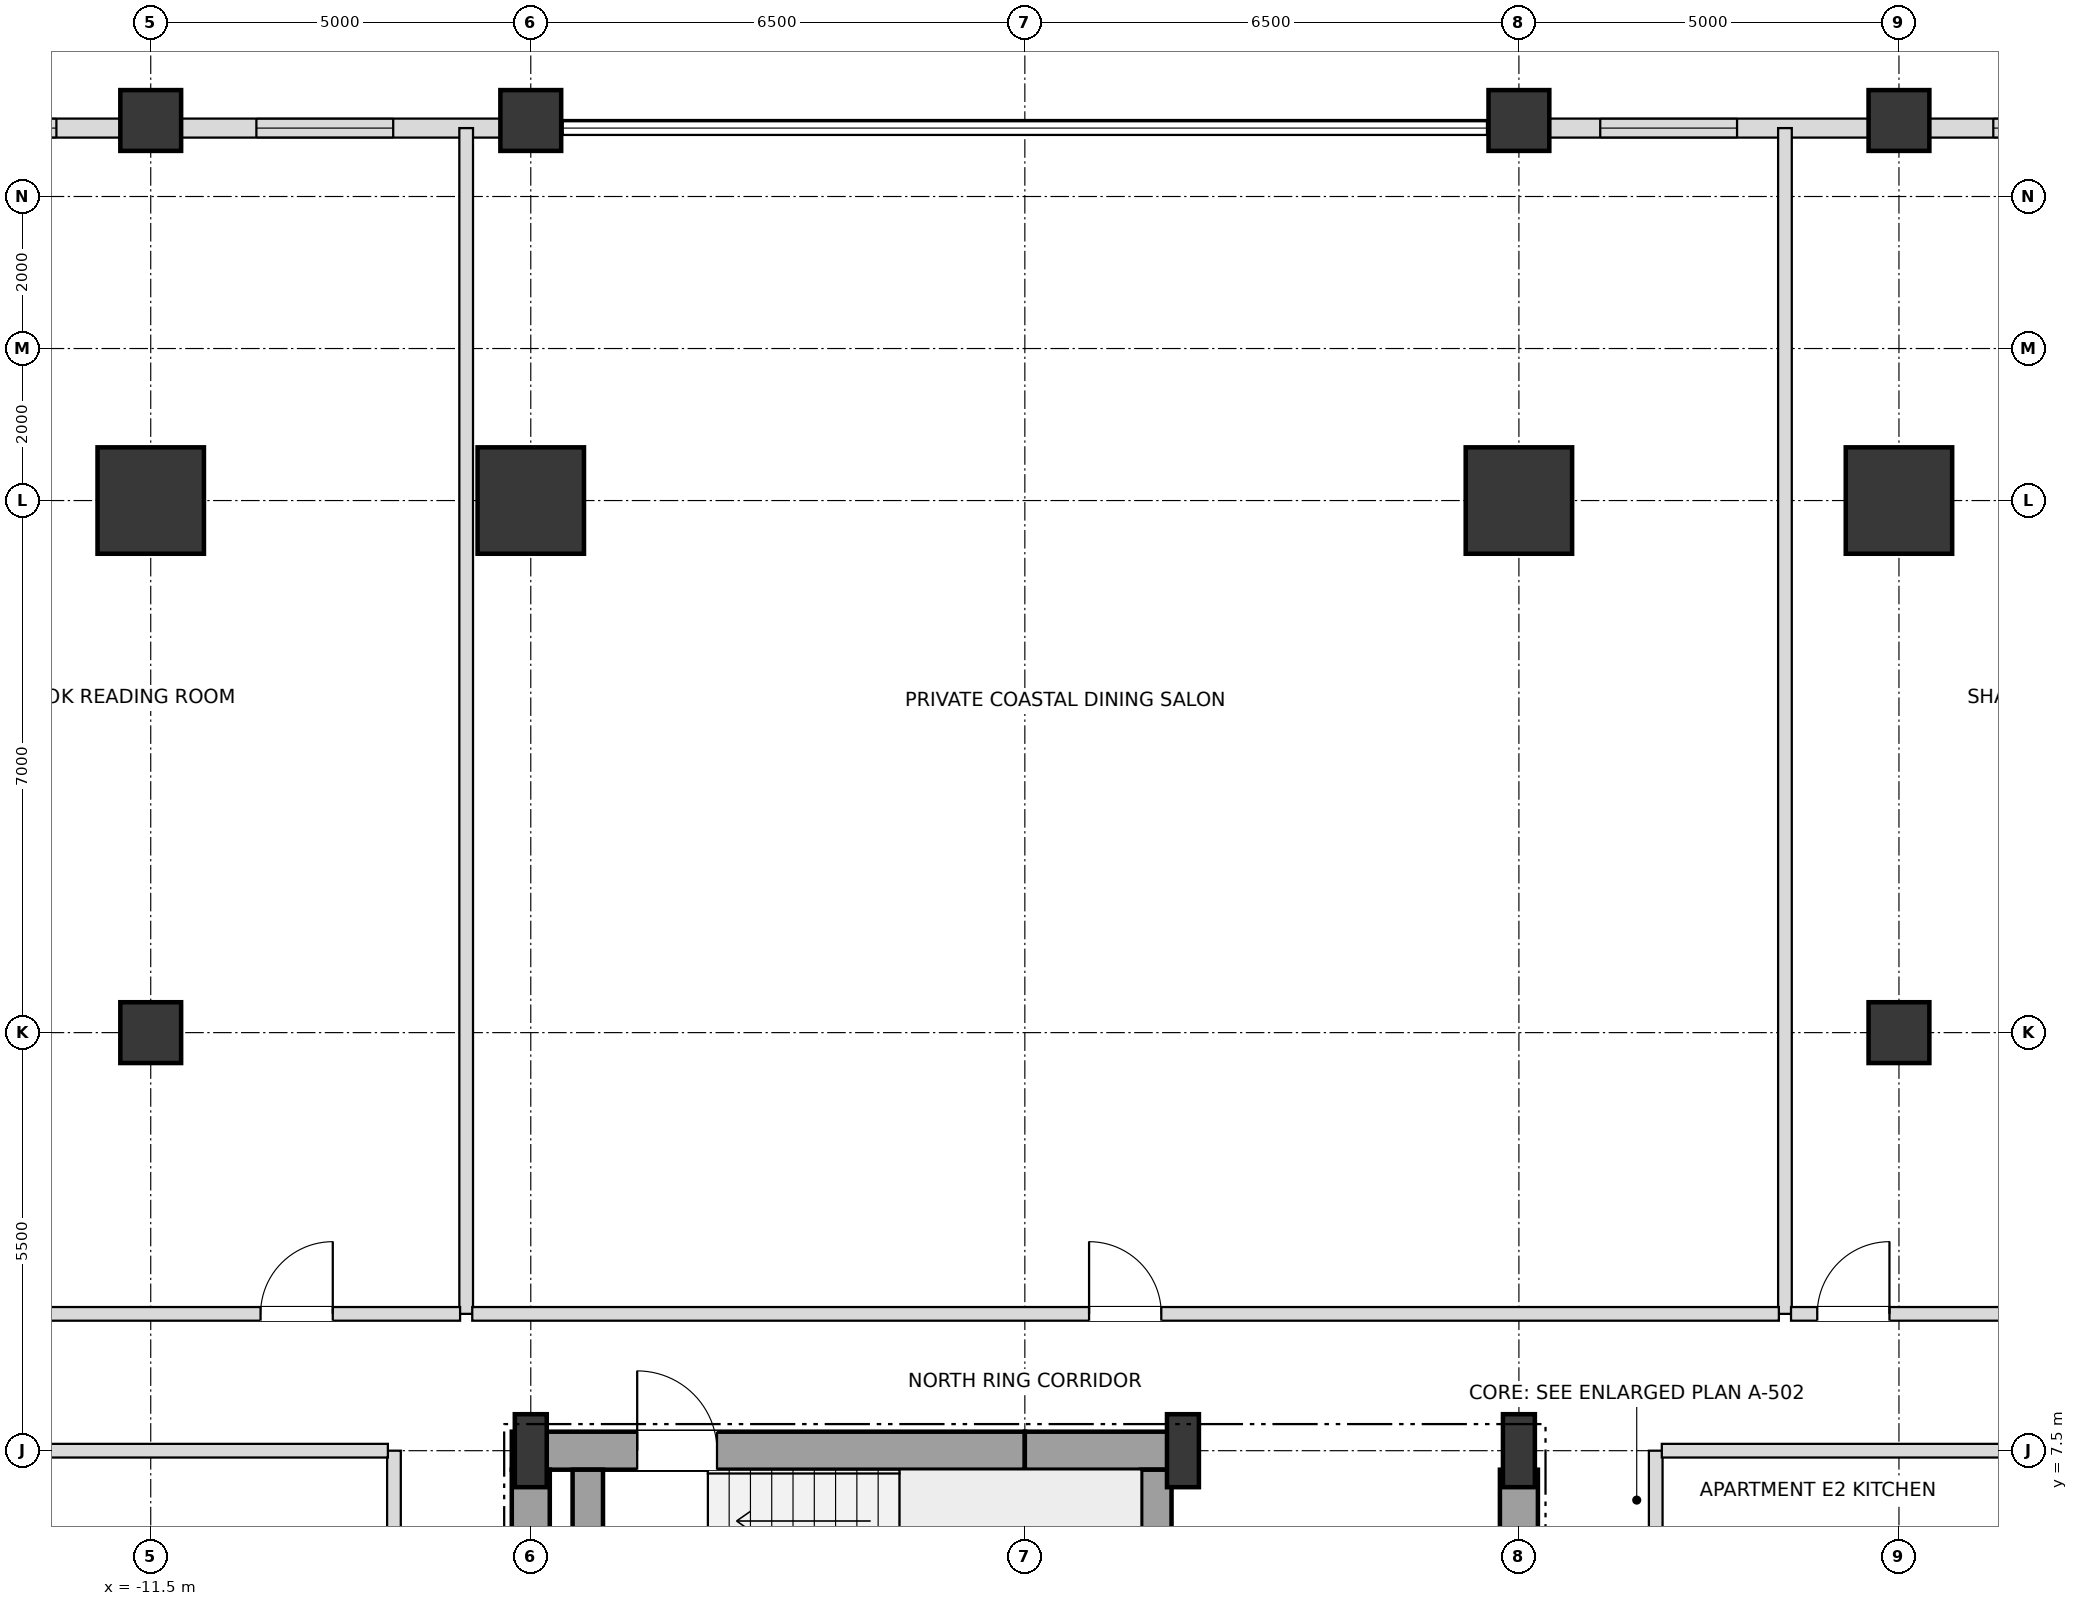
"""IFC4 building model, lengths in metres.
Left out: names, types, materials, properties, quantities, classifications, styles, units other than length and angle.
Written with IfcOpenShell. Run it as: python <this file> out.ifc"""

import sys

from ifc_helpers import new_model, si_unit, direction, frame, frame_2d, origin, origin_2d, place, context, subcontext, project, spatial, rectangle, i_section, extrude, element, fill, save


model = new_model("IFC4")
c1 = context("Model", 3, precision=1e-05, world=origin(), true_north=direction((0.0, 1.0)))
c2 = subcontext(c1, "Body", "Model", "MODEL_VIEW")
j1 = project(units=[si_unit("LENGTHUNIT", "METRE"), si_unit("PLANEANGLEUNIT", "RADIAN")], contexts=[c1])
p1 = place(None, origin())
s1 = spatial("IfcSite", under=j1, at=p1, CompositionType="ELEMENT")
p2 = place(p1, origin())
s2 = spatial("IfcBuilding", under=s1, at=p2, CompositionType="ELEMENT")
p3 = place(p2, frame((0.0, 0.0, 68.4)))
s3 = spatial("IfcBuildingStorey", under=s2, at=p3, CompositionType="ELEMENT", Elevation=68.4)
for number, where, z_axis, x_axis in (
    (1, (-6.5, 7.5, 0.0), (0.0, 0.0, 1.0), (1.0, 0.0, 0.0)),
    (2, (2.08, 7.5, 0.0), (0.0, 0.0, 1.0), (1.0, 0.0, 0.0)),
    (3, (6.5, 7.5, 0.0), (0.0, 0.0, 1.0), (1.0, 0.0, 0.0)),
):
    element("IfcColumn", number, at=place(p3, frame(where, z_axis=z_axis, x_axis=x_axis)), inside=s3, PredefinedType="COLUMN", context=c2, shape_type="SweptSolid", body=[
        extrude(i_section(OverallWidth=0.42, OverallDepth=0.96, WebThickness=0.022, FlangeThickness=0.034, at=origin_2d()), origin(), (0.0, 0.0, 1.0), 3.6),
    ])
for number, where, z_axis, x_axis in (
    (4, (11.5, 20.0, 0.0), (0.0, 0.0, 1.0), (1.0, 0.0, 0.0)),
    (5, (6.5, 20.0, 0.0), (0.0, 0.0, 1.0), (1.0, 0.0, 0.0)),
    (6, (-6.5, 20.0, 0.0), (0.0, 0.0, 1.0), (1.0, 0.0, 0.0)),
    (7, (-11.5, 20.0, 0.0), (0.0, 0.0, 1.0), (1.0, 0.0, 0.0)),
):
    element("IfcColumn", number, at=place(p3, frame(where, z_axis=z_axis, x_axis=x_axis)), inside=s3, PredefinedType="USERDEFINED", context=c2, shape_type="SweptSolid", body=[
        extrude(rectangle(XDim=1.4, YDim=1.4, at=origin_2d()), origin(), (0.0, 0.0, 1.0), 3.6),
    ])
for number, where, z_axis, x_axis in (
    (8, (-11.5, 13.0, 0.0), (0.0, 0.0, 1.0), (1.0, 0.0, 0.0)),
    (9, (11.5, 13.0, 0.0), (0.0, 0.0, 1.0), (1.0, 0.0, 0.0)),
    (10, (-11.5, 25.0, 0.0), (0.0, 0.0, 1.0), (1.0, 0.0, 0.0)),
    (11, (-6.5, 25.0, 0.0), (0.0, 0.0, 1.0), (1.0, 0.0, 0.0)),
    (12, (6.5, 25.0, 0.0), (0.0, 0.0, 1.0), (1.0, 0.0, 0.0)),
    (13, (11.5, 25.0, 0.0), (0.0, 0.0, 1.0), (1.0, 0.0, 0.0)),
):
    element("IfcColumn", number, at=place(p3, frame(where, z_axis=z_axis, x_axis=x_axis)), inside=s3, PredefinedType="COLUMN", context=c2, shape_type="SweptSolid", body=[
        extrude(rectangle(XDim=0.8, YDim=0.8, at=origin_2d()), origin(), (0.0, 0.0, 1.0), 3.6),
    ])
p4 = place(p3, frame((18.425, 24.9, 0.0), z_axis=(0.0, 0.0, 1.0), x_axis=(-1.0, 0.0, 0.0)))
e14 = element("IfcWall", 14, at=p4, inside=s3, PredefinedType="SOLIDWALL", context=c2, shape_type="SweptSolid", body=[
    extrude(rectangle(XDim=6.53, YDim=0.25, at=frame_2d((3.265, 0.0))), origin(), (0.0, 0.0, 1.0), 2.736),
])
p5 = place(p4, frame((0.801, 0.0, 0.72)))
e15 = element("IfcOpeningElement", 15, at=p5, cuts=e14, PredefinedType="OPENING", context=c2, shape_type="SweptSolid", body=[
    extrude(rectangle(XDim=1.8, YDim=1.68, at=frame_2d((0.9, 0.84))), frame((0.0, 0.135, 0.0), z_axis=(0.0, -1.0, 0.0), x_axis=(1.0, 0.0, 0.0)), (0.0, 0.0, 1.0), 0.27),
])
p6 = place(p4, frame((3.884, 0.0, 0.72)))
e16 = element("IfcOpeningElement", 16, at=p6, cuts=e14, PredefinedType="OPENING", context=c2, shape_type="SweptSolid", body=[
    extrude(rectangle(XDim=1.8, YDim=1.68, at=frame_2d((0.9, 0.84))), frame((0.0, 0.135, 0.0), z_axis=(0.0, -1.0, 0.0), x_axis=(1.0, 0.0, 0.0)), (0.0, 0.0, 1.0), 0.27),
])
p7 = place(p3, frame((11.105, 24.9, 0.0), z_axis=(0.0, 0.0, 1.0), x_axis=(-1.0, 0.0, 0.0)))
e17 = element("IfcWall", 17, at=p7, inside=s3, PredefinedType="SOLIDWALL", context=c2, shape_type="SweptSolid", body=[
    extrude(rectangle(XDim=4.21, YDim=0.25, at=frame_2d((2.105, 0.0))), origin(), (0.0, 0.0, 1.0), 2.736),
])
p8 = place(p7, frame((1.735, 0.0, 0.72)))
e18 = element("IfcOpeningElement", 18, at=p8, cuts=e17, PredefinedType="OPENING", context=c2, shape_type="SweptSolid", body=[
    extrude(rectangle(XDim=1.8, YDim=1.68, at=frame_2d((0.9, 0.84))), frame((0.0, 0.135, 0.0), z_axis=(0.0, -1.0, 0.0), x_axis=(1.0, 0.0, 0.0)), (0.0, 0.0, 1.0), 0.27),
])
p9 = place(p3, frame((-6.895, 24.9, 0.0), z_axis=(0.0, 0.0, 1.0), x_axis=(-1.0, 0.0, 0.0)))
e19 = element("IfcWall", 19, at=p9, inside=s3, PredefinedType="SOLIDWALL", context=c2, shape_type="SweptSolid", body=[
    extrude(rectangle(XDim=4.21, YDim=0.25, at=frame_2d((2.105, 0.0))), origin(), (0.0, 0.0, 1.0), 2.736),
])
p10 = place(p9, frame((1.415, 0.0, 0.72)))
e20 = element("IfcOpeningElement", 20, at=p10, cuts=e19, PredefinedType="OPENING", context=c2, shape_type="SweptSolid", body=[
    extrude(rectangle(XDim=1.8, YDim=1.68, at=frame_2d((0.9, 0.84))), frame((0.0, 0.135, 0.0), z_axis=(0.0, -1.0, 0.0), x_axis=(1.0, 0.0, 0.0)), (0.0, 0.0, 1.0), 0.27),
])
p11 = place(p3, frame((-11.895, 24.9, 0.0), z_axis=(0.0, 0.0, 1.0), x_axis=(-1.0, 0.0, 0.0)))
e21 = element("IfcWall", 21, at=p11, inside=s3, PredefinedType="SOLIDWALL", context=c2, shape_type="SweptSolid", body=[
    extrude(rectangle(XDim=6.53, YDim=0.25, at=frame_2d((3.265, 0.0))), origin(), (0.0, 0.0, 1.0), 2.736),
])
p12 = place(p11, frame((0.846, 0.0, 0.72)))
e22 = element("IfcOpeningElement", 22, at=p12, cuts=e21, PredefinedType="OPENING", context=c2, shape_type="SweptSolid", body=[
    extrude(rectangle(XDim=1.8, YDim=1.68, at=frame_2d((0.9, 0.84))), frame((0.0, 0.135, 0.0), z_axis=(0.0, -1.0, 0.0), x_axis=(1.0, 0.0, 0.0)), (0.0, 0.0, 1.0), 0.27),
])
p13 = place(p11, frame((3.929, 0.0, 0.72)))
e23 = element("IfcOpeningElement", 23, at=p13, cuts=e21, PredefinedType="OPENING", context=c2, shape_type="SweptSolid", body=[
    extrude(rectangle(XDim=1.8, YDim=1.68, at=frame_2d((0.9, 0.84))), frame((0.0, 0.135, 0.0), z_axis=(0.0, -1.0, 0.0), x_axis=(1.0, 0.0, 0.0)), (0.0, 0.0, 1.0), 0.27),
])
p14 = place(p3, frame((-6.75, 7.5, 0.0), z_axis=(0.0, 0.0, 1.0), x_axis=(1.0, 0.0, 0.0)))
e24 = element("IfcWall", 24, at=p14, inside=s3, PredefinedType="SHEAR", context=c2, shape_type="SweptSolid", body=[
    extrude(rectangle(XDim=6.75, YDim=0.5, at=frame_2d((3.375, 0.0))), origin(), (0.0, 0.0, 1.0), 3.38),
])
p15 = place(p14, frame((1.65, 0.0, 0.0)))
e25 = element("IfcOpeningElement", 25, at=p15, cuts=e24, PredefinedType="OPENING", context=c2, shape_type="SweptSolid", body=[
    extrude(rectangle(XDim=1.05, YDim=2.15, at=frame_2d((0.525, 1.075))), frame((0.0, 0.26, 0.0), z_axis=(0.0, -1.0, 0.0), x_axis=(1.0, 0.0, 0.0)), (0.0, 0.0, 1.0), 0.52),
])
p16 = place(p3, frame((0.0, 7.5, 0.0), z_axis=(0.0, 0.0, 1.0), x_axis=(1.0, 0.0, 0.0)))
e26 = element("IfcWall", 26, at=p16, inside=s3, PredefinedType="SHEAR", context=c2, shape_type="SweptSolid", body=[
    extrude(rectangle(XDim=2.08, YDim=0.5, at=frame_2d((1.04, 0.0))), origin(), (0.0, 0.0, 1.0), 3.38),
])
for number, where, z_axis, x_axis in (
    (27, (-6.5, 3.95, 0.0), (0.0, 0.0, 1.0), (0.0, 1.0, 0.0)),
    (28, (6.5, 3.95, 0.0), (0.0, 0.0, 1.0), (0.0, 1.0, 0.0)),
):
    element("IfcWall", number, at=place(p3, frame(where, z_axis=z_axis, x_axis=x_axis)), inside=s3, PredefinedType="SHEAR", context=c2, shape_type="SweptSolid", body=[
        extrude(rectangle(XDim=3.3, YDim=0.5, at=frame_2d((1.65, 0.0))), origin(), (0.0, 0.0, 1.0), 3.38),
    ])
for number, where, z_axis, x_axis in (
    (29, (1.73, 3.95, 0.0), (0.0, 0.0, 1.0), (0.0, 1.0, 0.0)),
    (30, (-5.75, 3.95, 0.0), (0.0, 0.0, 1.0), (0.0, 1.0, 0.0)),
):
    element("IfcWall", number, at=place(p3, frame(where, z_axis=z_axis, x_axis=x_axis)), inside=s3, PredefinedType="SHEAR", context=c2, shape_type="SweptSolid", body=[
        extrude(rectangle(XDim=3.3, YDim=0.4, at=frame_2d((1.65, 0.0))), origin(), (0.0, 0.0, 1.0), 3.38),
    ])
p17 = place(p3, frame((-8.3, -7.5, 0.0), z_axis=(0.0, 0.0, 1.0), x_axis=(0.0, 1.0, 0.0)))
e31 = element("IfcWall", 31, at=p17, inside=s3, PredefinedType="PARTITIONING", context=c2, shape_type="SweptSolid", body=[
    extrude(rectangle(XDim=15.0, YDim=0.18, at=frame_2d((7.5, 0.0))), origin(), (0.0, 0.0, 1.0), 3.38),
])
p18 = place(p17, frame((3.475, 0.0, 0.0)))
e32 = element("IfcOpeningElement", 32, at=p18, cuts=e31, PredefinedType="OPENING", context=c2, shape_type="SweptSolid", body=[
    extrude(rectangle(XDim=0.95, YDim=2.15, at=frame_2d((0.475, 1.075))), frame((0.0, 0.1, 0.0), z_axis=(0.0, -1.0, 0.0), x_axis=(1.0, 0.0, 0.0)), (0.0, 0.0, 1.0), 0.2),
])
p19 = place(p3, frame((-7.35, 9.3, 0.0), z_axis=(0.0, 0.0, 1.0), x_axis=(0.0, 1.0, 0.0)))
e33 = element("IfcWall", 33, at=p19, inside=s3, PredefinedType="PARTITIONING", context=c2, shape_type="SweptSolid", body=[
    extrude(rectangle(XDim=15.6, YDim=0.18, at=frame_2d((7.8, 0.0))), origin(), (0.0, 0.0, 1.0), 2.816),
])
p20 = place(p3, frame((8.3, -7.5, 0.0), z_axis=(0.0, 0.0, 1.0), x_axis=(0.0, 1.0, 0.0)))
e34 = element("IfcWall", 34, at=p20, inside=s3, PredefinedType="PARTITIONING", context=c2, shape_type="SweptSolid", body=[
    extrude(rectangle(XDim=15.0, YDim=0.18, at=frame_2d((7.5, 0.0))), origin(), (0.0, 0.0, 1.0), 3.38),
])
p21 = place(p20, frame((3.305, 0.0, 0.0)))
e35 = element("IfcOpeningElement", 35, at=p21, cuts=e34, PredefinedType="OPENING", context=c2, shape_type="SweptSolid", body=[
    extrude(rectangle(XDim=0.95, YDim=2.15, at=frame_2d((0.475, 1.075))), frame((0.0, 0.1, 0.0), z_axis=(0.0, -1.0, 0.0), x_axis=(1.0, 0.0, 0.0)), (0.0, 0.0, 1.0), 0.2),
])
p22 = place(p20, frame((10.805, 0.0, 0.0)))
e36 = element("IfcOpeningElement", 36, at=p22, cuts=e34, PredefinedType="OPENING", context=c2, shape_type="SweptSolid", body=[
    extrude(rectangle(XDim=0.95, YDim=2.15, at=frame_2d((0.475, 1.075))), frame((0.0, 0.1, 0.0), z_axis=(0.0, -1.0, 0.0), x_axis=(1.0, 0.0, 0.0)), (0.0, 0.0, 1.0), 0.2),
])
p23 = place(p3, frame((10.0, 9.3, 0.0), z_axis=(0.0, 0.0, 1.0), x_axis=(0.0, 1.0, 0.0)))
e37 = element("IfcWall", 37, at=p23, inside=s3, PredefinedType="PARTITIONING", context=c2, shape_type="SweptSolid", body=[
    extrude(rectangle(XDim=15.6, YDim=0.18, at=frame_2d((7.8, 0.0))), origin(), (0.0, 0.0, 1.0), 2.816),
])
for number, where, z_axis, x_axis in (
    (38, (-16.02, 7.5, 0.0), (0.0, 0.0, 1.0), (1.0, 0.0, 0.0)),
    (39, (8.38, 7.5, 0.0), (0.0, 0.0, 1.0), (1.0, 0.0, 0.0)),
):
    element("IfcWall", number, at=place(p3, frame(where, z_axis=z_axis, x_axis=x_axis)), inside=s3, PredefinedType="PARTITIONING", context=c2, shape_type="SweptSolid", body=[
        extrude(rectangle(XDim=7.64, YDim=0.18, at=frame_2d((3.82, 0.0))), origin(), (0.0, 0.0, 1.0), 2.816),
    ])
p24 = place(p3, frame((-18.4, 9.3, 0.0), z_axis=(0.0, 0.0, 1.0), x_axis=(1.0, 0.0, 0.0)))
e40 = element("IfcWall", 40, at=p24, inside=s3, PredefinedType="PARTITIONING", context=c2, shape_type="SweptSolid", body=[
    extrude(rectangle(XDim=10.97, YDim=0.18, at=frame_2d((5.485, 0.0))), origin(), (0.0, 0.0, 1.0), 2.816),
])
p25 = place(p24, frame((8.345, 0.0, 0.0)))
e41 = element("IfcOpeningElement", 41, at=p25, cuts=e40, PredefinedType="OPENING", context=c2, shape_type="SweptSolid", body=[
    extrude(rectangle(XDim=0.95, YDim=2.15, at=frame_2d((0.475, 1.075))), frame((0.0, 0.1, 0.0), z_axis=(0.0, -1.0, 0.0), x_axis=(1.0, 0.0, 0.0)), (0.0, 0.0, 1.0), 0.2),
])
p26 = place(p3, frame((-7.27, 9.3, 0.0), z_axis=(0.0, 0.0, 1.0), x_axis=(1.0, 0.0, 0.0)))
e42 = element("IfcWall", 42, at=p26, inside=s3, PredefinedType="PARTITIONING", context=c2, shape_type="SweptSolid", body=[
    extrude(rectangle(XDim=17.19, YDim=0.18, at=frame_2d((8.595, 0.0))), origin(), (0.0, 0.0, 1.0), 2.816),
])
p27 = place(p26, frame((8.115, 0.0, 0.0)))
e43 = element("IfcOpeningElement", 43, at=p27, cuts=e42, PredefinedType="OPENING", context=c2, shape_type="SweptSolid", body=[
    extrude(rectangle(XDim=0.95, YDim=2.15, at=frame_2d((0.475, 1.075))), frame((0.0, 0.1, 0.0), z_axis=(0.0, -1.0, 0.0), x_axis=(1.0, 0.0, 0.0)), (0.0, 0.0, 1.0), 0.2),
])
p28 = place(p3, frame((10.08, 9.3, 0.0), z_axis=(0.0, 0.0, 1.0), x_axis=(1.0, 0.0, 0.0)))
e44 = element("IfcWall", 44, at=p28, inside=s3, PredefinedType="PARTITIONING", context=c2, shape_type="SweptSolid", body=[
    extrude(rectangle(XDim=8.32, YDim=0.18, at=frame_2d((4.16, 0.0))), origin(), (0.0, 0.0, 1.0), 2.816),
])
p29 = place(p28, frame((0.345, 0.0, 0.0)))
e45 = element("IfcOpeningElement", 45, at=p29, cuts=e44, PredefinedType="OPENING", context=c2, shape_type="SweptSolid", body=[
    extrude(rectangle(XDim=0.95, YDim=2.15, at=frame_2d((0.475, 1.075))), frame((0.0, 0.1, 0.0), z_axis=(0.0, -1.0, 0.0), x_axis=(1.0, 0.0, 0.0)), (0.0, 0.0, 1.0), 0.2),
])
p30 = place(p6, origin())
e46 = element("IfcWindow", 46, at=p30, inside=s3, PartitioningType="SINGLE_PANEL", PredefinedType="WINDOW", context=c2, shape_type="SweptSolid", body=[
    extrude(rectangle(XDim=1.8, YDim=1.68, at=frame_2d((0.9, 0.84))), frame((0.0, 0.03, 0.0), z_axis=(0.0, -1.0, 0.0), x_axis=(1.0, 0.0, 0.0)), (0.0, 0.0, 1.0), 0.06),
])
fill(e16, e46)
p31 = place(p8, origin())
e47 = element("IfcWindow", 47, at=p31, inside=s3, PartitioningType="SINGLE_PANEL", PredefinedType="WINDOW", context=c2, shape_type="SweptSolid", body=[
    extrude(rectangle(XDim=1.8, YDim=1.68, at=frame_2d((0.9, 0.84))), frame((0.0, 0.03, 0.0), z_axis=(0.0, -1.0, 0.0), x_axis=(1.0, 0.0, 0.0)), (0.0, 0.0, 1.0), 0.06),
])
fill(e18, e47)
p32 = place(p10, origin())
e48 = element("IfcWindow", 48, at=p32, inside=s3, PartitioningType="SINGLE_PANEL", PredefinedType="WINDOW", context=c2, shape_type="SweptSolid", body=[
    extrude(rectangle(XDim=1.8, YDim=1.68, at=frame_2d((0.9, 0.84))), frame((0.0, 0.03, 0.0), z_axis=(0.0, -1.0, 0.0), x_axis=(1.0, 0.0, 0.0)), (0.0, 0.0, 1.0), 0.06),
])
fill(e20, e48)
p33 = place(p12, origin())
e49 = element("IfcWindow", 49, at=p33, inside=s3, PartitioningType="SINGLE_PANEL", PredefinedType="WINDOW", context=c2, shape_type="SweptSolid", body=[
    extrude(rectangle(XDim=1.8, YDim=1.68, at=frame_2d((0.9, 0.84))), frame((0.0, 0.03, 0.0), z_axis=(0.0, -1.0, 0.0), x_axis=(1.0, 0.0, 0.0)), (0.0, 0.0, 1.0), 0.06),
])
fill(e22, e49)
p34 = place(p15, origin())
e50 = element("IfcDoor", 50, at=p34, inside=s3, OperationType="SINGLE_SWING_LEFT", PredefinedType="DOOR", context=c2, shape_type="SweptSolid", body=[
    extrude(rectangle(XDim=1.05, YDim=2.15, at=frame_2d((0.525, 1.075))), frame((0.0, 0.025, 0.0), z_axis=(0.0, -1.0, 0.0), x_axis=(1.0, 0.0, 0.0)), (0.0, 0.0, 1.0), 0.05),
])
fill(e25, e50)
p35 = place(p25, origin())
e51 = element("IfcDoor", 51, at=p35, inside=s3, OperationType="SINGLE_SWING_RIGHT", PredefinedType="DOOR", context=c2, shape_type="SweptSolid", body=[
    extrude(rectangle(XDim=0.95, YDim=2.15, at=frame_2d((0.475, 1.075))), frame((0.0, 0.025, 0.0), z_axis=(0.0, -1.0, 0.0), x_axis=(1.0, 0.0, 0.0)), (0.0, 0.0, 1.0), 0.05),
])
fill(e41, e51)
p36 = place(p27, origin())
e52 = element("IfcDoor", 52, at=p36, inside=s3, OperationType="SINGLE_SWING_LEFT", PredefinedType="DOOR", context=c2, shape_type="SweptSolid", body=[
    extrude(rectangle(XDim=0.95, YDim=2.15, at=frame_2d((0.475, 1.075))), frame((0.0, 0.025, 0.0), z_axis=(0.0, -1.0, 0.0), x_axis=(1.0, 0.0, 0.0)), (0.0, 0.0, 1.0), 0.05),
])
fill(e43, e52)
p37 = place(p29, origin())
e53 = element("IfcDoor", 53, at=p37, inside=s3, OperationType="SINGLE_SWING_RIGHT", PredefinedType="DOOR", context=c2, shape_type="SweptSolid", body=[
    extrude(rectangle(XDim=0.95, YDim=2.15, at=frame_2d((0.475, 1.075))), frame((0.0, 0.025, 0.0), z_axis=(0.0, -1.0, 0.0), x_axis=(1.0, 0.0, 0.0)), (0.0, 0.0, 1.0), 0.05),
])
fill(e45, e53)
save(model, sys.argv[1])
